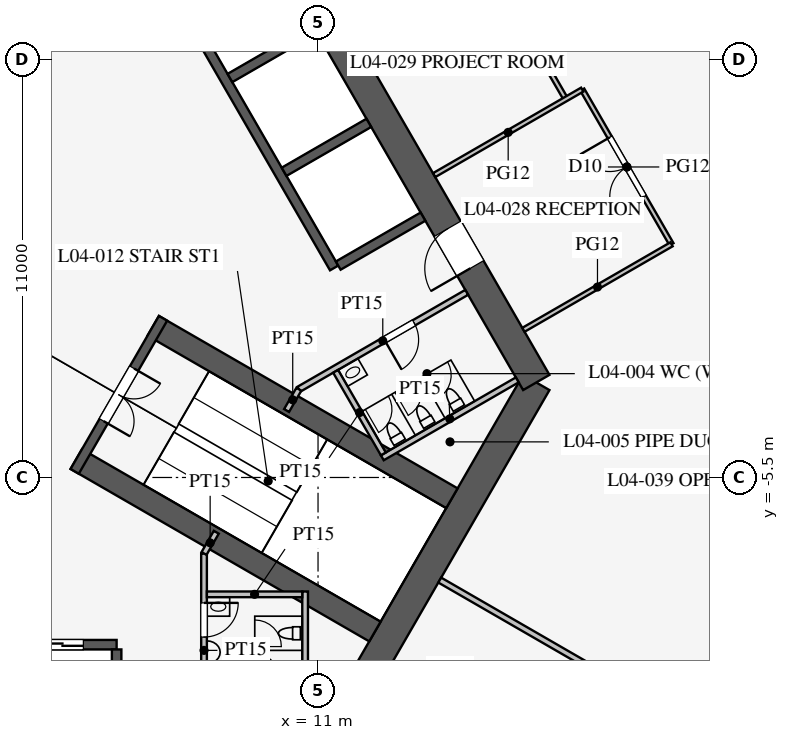
"""IFC4 building model, lengths in metres.
Left out: names, types, materials, properties, quantities, classifications, styles, units other than length and angle.
Written with IfcOpenShell. Run it as: python <this file> out.ifc"""

import sys

from ifc_helpers import new_model, si_unit, direction, frame, frame_2d, origin, place, context, subcontext, project, spatial, rectangle, extrude, element, fill, save


model = new_model("IFC4")
c1 = context("Model", 3, precision=1e-05, world=origin(), true_north=direction((0.0, 1.0)))
c2 = subcontext(c1, "Body", "Model", "MODEL_VIEW")
j1 = project(units=[si_unit("LENGTHUNIT", "METRE"), si_unit("PLANEANGLEUNIT", "RADIAN")], contexts=[c1])
p1 = place(None, origin())
s1 = spatial("IfcSite", under=j1, at=p1, CompositionType="ELEMENT")
p2 = place(p1, origin())
s2 = spatial("IfcBuilding", under=s1, at=p2, CompositionType="ELEMENT")
p3 = place(p2, frame((0.0, 0.0, 20.7)))
s3 = spatial("IfcBuildingStorey", under=s2, at=p3, CompositionType="ELEMENT", Elevation=20.7)
p4 = place(p3, frame((10.97, -13.0, 0.0), z_axis=(0.0, 0.0, 1.0), x_axis=(0.499995765644, 0.866027848477, 0.0)))
e1 = element("IfcWall", 1, at=p4, inside=s3, PredefinedType="SHEAR", context=c2, shape_type="SweptSolid", body=[
    extrude(rectangle(XDim=11.547, YDim=0.8, at=frame_2d((5.773, 0.0))), origin(), (0.0, 0.0, 1.0), 4.2),
])
p5 = place(p3, frame((16.743, -3.0, 0.0), z_axis=(0.0, 0.0, 1.0), x_axis=(-0.500002442456, 0.866023993627, 0.0)))
e2 = element("IfcWall", 2, at=p5, inside=s3, PredefinedType="SHEAR", context=c2, shape_type="SweptSolid", body=[
    extrude(rectangle(XDim=21.939, YDim=0.8, at=frame_2d((10.97, 0.0))), origin(), (0.0, 0.0, 1.0), 4.2),
])
p6 = place(p5, frame((17.27, 0.0, 0.0)))
e3 = element("IfcOpeningElement", 3, at=p6, cuts=e2, PredefinedType="OPENING", context=c2, shape_type="SweptSolid", body=[
    extrude(rectangle(XDim=1.2, YDim=2.1, at=frame_2d((0.6, 1.05))), frame((0.0, 0.41, 0.0), z_axis=(0.0, -1.0, 0.0), x_axis=(1.0, 0.0, 0.0)), (0.0, 0.0, 1.0), 0.82),
])
p7 = place(p5, frame((3.47, 0.0, 0.0)))
e4 = element("IfcOpeningElement", 4, at=p7, cuts=e2, PredefinedType="OPENING", context=c2, shape_type="SweptSolid", body=[
    extrude(rectangle(XDim=1.2, YDim=2.1, at=frame_2d((0.6, 1.05))), frame((0.0, 0.41, 0.0), z_axis=(0.0, -1.0, 0.0), x_axis=(1.0, 0.0, 0.0)), (0.0, 0.0, 1.0), 0.82),
])
p8 = place(p3, frame((-5.7, -9.9, 0.0), z_axis=(0.0, 0.0, 1.0), x_axis=(1.0, 0.0, 0.0)))
e5 = element("IfcWall", 5, at=p8, inside=s3, PredefinedType="SHEAR", context=c2, shape_type="SweptSolid", body=[
    extrude(rectangle(XDim=11.4, YDim=0.25, at=frame_2d((5.7, 0.0))), origin(), (0.0, 0.0, 1.0), 4.2),
])
p9 = place(p8, frame((0.875, 0.0, 0.0)))
e6 = element("IfcOpeningElement", 6, at=p9, cuts=e5, PredefinedType="OPENING", context=c2, shape_type="SweptSolid", body=[
    extrude(rectangle(XDim=1.1, YDim=2.2, at=frame_2d((0.55, 1.1))), frame((0.0, 0.135, 0.0), z_axis=(0.0, -1.0, 0.0), x_axis=(1.0, 0.0, 0.0)), (0.0, 0.0, 1.0), 0.27),
])
p10 = place(p8, frame((3.725, 0.0, 0.0)))
e7 = element("IfcOpeningElement", 7, at=p10, cuts=e5, PredefinedType="OPENING", context=c2, shape_type="SweptSolid", body=[
    extrude(rectangle(XDim=1.1, YDim=2.2, at=frame_2d((0.55, 1.1))), frame((0.0, 0.135, 0.0), z_axis=(0.0, -1.0, 0.0), x_axis=(1.0, 0.0, 0.0)), (0.0, 0.0, 1.0), 0.27),
])
p11 = place(p8, frame((6.575, 0.0, 0.0)))
e8 = element("IfcOpeningElement", 8, at=p11, cuts=e5, PredefinedType="OPENING", context=c2, shape_type="SweptSolid", body=[
    extrude(rectangle(XDim=1.1, YDim=2.2, at=frame_2d((0.55, 1.1))), frame((0.0, 0.135, 0.0), z_axis=(0.0, -1.0, 0.0), x_axis=(1.0, 0.0, 0.0)), (0.0, 0.0, 1.0), 0.27),
])
p12 = place(p8, frame((9.425, 0.0, 0.0)))
e9 = element("IfcOpeningElement", 9, at=p12, cuts=e5, PredefinedType="OPENING", context=c2, shape_type="SweptSolid", body=[
    extrude(rectangle(XDim=1.1, YDim=2.2, at=frame_2d((0.55, 1.1))), frame((0.0, 0.135, 0.0), z_axis=(0.0, -1.0, 0.0), x_axis=(1.0, 0.0, 0.0)), (0.0, 0.0, 1.0), 0.27),
])
p13 = place(p3, frame((5.7, -10.025, 0.0), z_axis=(0.0, 0.0, 1.0), x_axis=(0.0, -1.0, 0.0)))
e10 = element("IfcWall", 10, at=p13, inside=s3, PredefinedType="SHEAR", context=c2, shape_type="SweptSolid", body=[
    extrude(rectangle(XDim=2.575, YDim=0.25, at=frame_2d((1.288, 0.0))), origin(), (0.0, 0.0, 1.0), 4.2),
])
p14 = place(p3, frame((11.424, 0.014, 0.0), z_axis=(0.0, 0.0, 1.0), x_axis=(-0.500001763848, 0.866024385424, 0.0)))
e11 = element("IfcWall", 11, at=p14, inside=s3, PredefinedType="SHEAR", context=c2, shape_type="SweptSolid", body=[
    extrude(rectangle(XDim=11.4, YDim=0.25, at=frame_2d((5.7, 0.0))), origin(), (0.0, 0.0, 1.0), 4.2),
])
for number, where, z_axis, x_axis in (
    (12, (11.532, 0.076, 0.0), (0.0, 0.0, 1.0), (0.866, 0.5, 0.0)),
    (13, (10.107, 2.544, 0.0), (0.0, 0.0, 1.0), (0.866, 0.5, 0.0)),
    (14, (8.682, 5.012, 0.0), (0.0, 0.0, 1.0), (0.866, 0.5, 0.0)),
):
    element("IfcWall", number, at=place(p3, frame(where, z_axis=z_axis, x_axis=x_axis)), inside=s3, PredefinedType="SHEAR", context=c2, shape_type="SweptSolid", body=[
        extrude(rectangle(XDim=2.575, YDim=0.25, at=frame_2d((1.288, 0.0))), origin(), (0.0, 0.0, 1.0), 4.2),
    ])
for number, where, z_axis, x_axis in (
    (15, (4.638, -5.016, 0.0), (0.0, 0.0, 1.0), (0.866, -0.5, 0.0)),
    (16, (6.663, -1.509, 0.0), (0.0, 0.0, 1.0), (0.866, -0.5, 0.0)),
):
    element("IfcWall", number, at=place(p3, frame(where, z_axis=z_axis, x_axis=x_axis)), inside=s3, PredefinedType="SHEAR", context=c2, shape_type="SweptSolid", body=[
        extrude(rectangle(XDim=9.075, YDim=0.6, at=frame_2d((4.538, 0.0))), origin(), (0.0, 0.0, 1.0), 4.2),
    ])
p15 = place(p3, frame((4.597, -5.339, 0.0), z_axis=(0.0, 0.0, 1.0), x_axis=(0.499984536904, 0.866034331223, 0.0)))
e17 = element("IfcWall", 17, at=p15, inside=s3, PredefinedType="SHEAR", context=c2, shape_type="SweptSolid", body=[
    extrude(rectangle(XDim=4.65, YDim=0.25, at=frame_2d((2.325, 0.0))), origin(), (0.0, 0.0, 1.0), 4.2),
])
p16 = place(p15, frame((1.525, 0.0, 0.0)))
e18 = element("IfcOpeningElement", 18, at=p16, cuts=e17, PredefinedType="OPENING", context=c2, shape_type="SweptSolid", body=[
    extrude(rectangle(XDim=1.6, YDim=2.1, at=frame_2d((0.8, 1.05))), frame((0.0, 0.135, 0.0), z_axis=(0.0, -1.0, 0.0), x_axis=(1.0, 0.0, 0.0)), (0.0, 0.0, 1.0), 0.27),
])
p17 = place(p3, frame((8.0, -7.5, 0.0), z_axis=(0.0, 0.0, 1.0), x_axis=(0.0, -1.0, 0.0)))
e19 = element("IfcWall", 19, at=p17, inside=s3, PredefinedType="PARTITIONING", context=c2, shape_type="SweptSolid", body=[
    extrude(rectangle(XDim=5.1, YDim=0.15, at=frame_2d((2.55, 0.0))), origin(), (0.0, 0.0, 1.0), 4.0),
])
p18 = place(p17, frame((1.3, 0.0, 0.0)))
e20 = element("IfcOpeningElement", 20, at=p18, cuts=e19, PredefinedType="OPENING", context=c2, shape_type="SweptSolid", body=[
    extrude(rectangle(XDim=0.9, YDim=2.1, at=frame_2d((0.45, 1.05))), frame((0.0, 0.085, 0.0), z_axis=(0.0, -1.0, 0.0), x_axis=(1.0, 0.0, 0.0)), (0.0, 0.0, 1.0), 0.17),
])
p19 = place(p3, frame((10.495, -3.178, 0.0), z_axis=(0.0, 0.0, 1.0), x_axis=(0.86602216432, 0.500005610874, 0.0)))
e21 = element("IfcWall", 21, at=p19, inside=s3, PredefinedType="PARTITIONING", context=c2, shape_type="SweptSolid", body=[
    extrude(rectangle(XDim=5.1, YDim=0.15, at=frame_2d((2.55, 0.0))), origin(), (0.0, 0.0, 1.0), 4.0),
])
p20 = place(p19, frame((2.6, 0.0, 0.0)))
e22 = element("IfcOpeningElement", 22, at=p20, cuts=e21, PredefinedType="OPENING", context=c2, shape_type="SweptSolid", body=[
    extrude(rectangle(XDim=0.9, YDim=2.1, at=frame_2d((0.45, 1.05))), frame((0.0, 0.085, 0.0), z_axis=(0.0, -1.0, 0.0), x_axis=(1.0, 0.0, 0.0)), (0.0, 0.0, 1.0), 0.17),
])
for number, where, z_axis, x_axis in (
    (23, (8.0, -7.5, 0.0), (0.0, 0.0, 1.0), (0.5, 0.866, 0.0)),
    (24, (10.495, -3.178, 0.0), (0.0, 0.0, 1.0), (-0.5, -0.866, 0.0)),
):
    element("IfcWall", number, at=place(p3, frame(where, z_axis=z_axis, x_axis=x_axis)), inside=s3, PredefinedType="PARTITIONING", context=c2, shape_type="SweptSolid", body=[
        extrude(rectangle(XDim=0.645, YDim=0.15, at=frame_2d((0.323, 0.0))), origin(), (0.0, 0.0, 1.0), 4.0),
    ])
p21 = place(p3, frame((10.66, -8.5, 0.0), z_axis=(0.0, 0.0, 1.0), x_axis=(0.0, -1.0, 0.0)))
e25 = element("IfcWall", 25, at=p21, inside=s3, PredefinedType="PARTITIONING", context=c2, shape_type="SweptSolid", body=[
    extrude(rectangle(XDim=4.1, YDim=0.15, at=frame_2d((2.05, 0.0))), origin(), (0.0, 0.0, 1.0), 4.0),
])
p22 = place(p3, frame((8.075, -8.575, 0.0), z_axis=(0.0, 0.0, 1.0), x_axis=(1.0, 0.0, 0.0)))
e26 = element("IfcWall", 26, at=p22, inside=s3, PredefinedType="PARTITIONING", context=c2, shape_type="SweptSolid", body=[
    extrude(rectangle(XDim=2.51, YDim=0.15, at=frame_2d((1.255, 0.0))), origin(), (0.0, 0.0, 1.0), 4.0),
])
p23 = place(p3, frame((12.691, -4.982, 0.0), z_axis=(0.0, 0.0, 1.0), x_axis=(0.8660249478, 0.500000789788, 0.0)))
e27 = element("IfcWall", 27, at=p23, inside=s3, PredefinedType="PARTITIONING", context=c2, shape_type="SweptSolid", body=[
    extrude(rectangle(XDim=4.1, YDim=0.15, at=frame_2d((2.05, 0.0))), origin(), (0.0, 0.0, 1.0), 4.0),
])
p24 = place(p3, frame((11.464, -2.706, 0.0), z_axis=(0.0, 0.0, 1.0), x_axis=(0.50001992892, -0.866013897511, 0.0)))
e28 = element("IfcWall", 28, at=p24, inside=s3, PredefinedType="PARTITIONING", context=c2, shape_type="SweptSolid", body=[
    extrude(rectangle(XDim=2.51, YDim=0.15, at=frame_2d((1.255, 0.0))), origin(), (0.0, 0.0, 1.0), 4.0),
])
p25 = place(p3, frame((14.203, -8.2, 0.0), z_axis=(0.0, 0.0, 1.0), x_axis=(0.866024965723, -0.500000758745, 0.0)))
e29 = element("IfcWall", 29, at=p25, inside=s3, PredefinedType="PARTITIONING", context=c2, shape_type="SweptSolid", body=[
    extrude(rectangle(XDim=18.25, YDim=0.15, at=frame_2d((9.125, 0.0))), origin(), (0.0, 0.0, 1.0), 2.3),
])
p26 = place(p3, frame((17.519, 4.457, 0.0), z_axis=(0.0, 0.0, 1.0), x_axis=(-0.500013631625, 0.866017533419, 0.0)))
e30 = element("IfcWall", 30, at=p26, inside=s3, PredefinedType="PARTITIONING", context=c2, shape_type="SweptSolid", body=[
    extrude(rectangle(XDim=4.5, YDim=0.12, at=frame_2d((2.25, 0.0))), origin(), (0.0, 0.0, 1.0), 2.9),
])
p27 = place(p26, frame((1.75, 0.0, 0.15)))
e31 = element("IfcOpeningElement", 31, at=p27, cuts=e30, PredefinedType="OPENING", context=c2, shape_type="SweptSolid", body=[
    extrude(rectangle(XDim=1.0, YDim=2.1, at=frame_2d((0.5, 1.05))), frame((0.0, 0.07, 0.0), z_axis=(0.0, -1.0, 0.0), x_axis=(1.0, 0.0, 0.0)), (0.0, 0.0, 1.0), 0.14),
])
p28 = place(p3, frame((20.302, 0.636, 0.0), z_axis=(0.0, 0.0, 1.0), x_axis=(-0.499977259774, 0.866038532462, 0.0)))
e32 = element("IfcWall", 32, at=p28, inside=s3, PredefinedType="PARTITIONING", context=c2, shape_type="SweptSolid", body=[
    extrude(rectangle(XDim=4.7, YDim=0.12, at=frame_2d((2.35, 0.0))), origin(), (0.0, 0.0, 1.0), 2.9),
])
p29 = place(p28, frame((1.45, 0.0, 0.15)))
e33 = element("IfcOpeningElement", 33, at=p29, cuts=e32, PredefinedType="OPENING", context=c2, shape_type="SweptSolid", body=[
    extrude(rectangle(XDim=1.8, YDim=2.1, at=frame_2d((0.9, 1.05))), frame((0.0, 0.07, 0.0), z_axis=(0.0, -1.0, 0.0), x_axis=(1.0, 0.0, 0.0)), (0.0, 0.0, 1.0), 0.14),
])
p30 = place(p3, frame((14.055, 2.457, 0.0), z_axis=(0.0, 0.0, 1.0), x_axis=(0.866031096941, 0.499990139034, 0.0)))
e34 = element("IfcWall", 34, at=p30, inside=s3, PredefinedType="PARTITIONING", context=c2, shape_type="SweptSolid", body=[
    extrude(rectangle(XDim=4.5, YDim=0.12, at=frame_2d((2.25, 0.0))), origin(), (0.0, 0.0, 1.0), 2.9),
])
p31 = place(p3, frame((16.405, -1.614, 0.0), z_axis=(0.0, 0.0, 1.0), x_axis=(0.866017533419, 0.500013631625, 0.0)))
e35 = element("IfcWall", 35, at=p31, inside=s3, PredefinedType="PARTITIONING", context=c2, shape_type="SweptSolid", body=[
    extrude(rectangle(XDim=4.5, YDim=0.12, at=frame_2d((2.25, 0.0))), origin(), (0.0, 0.0, 1.0), 2.9),
])
p32 = place(p18, origin())
e36 = element("IfcDoor", 36, at=p32, inside=s3, OperationType="SINGLE_SWING_LEFT", PredefinedType="DOOR", context=c2, shape_type="SweptSolid", body=[
    extrude(rectangle(XDim=0.9, YDim=2.1, at=frame_2d((0.45, 1.05))), frame((0.0, 0.025, 0.0), z_axis=(0.0, -1.0, 0.0), x_axis=(1.0, 0.0, 0.0)), (0.0, 0.0, 1.0), 0.05),
])
fill(e20, e36)
p33 = place(p20, frame((0.9, 0.0, 0.0), z_axis=(0.0, 0.0, 1.0), x_axis=(-1.0, 0.0, 0.0)))
e37 = element("IfcDoor", 37, at=p33, inside=s3, OperationType="SINGLE_SWING_RIGHT", PredefinedType="DOOR", context=c2, shape_type="SweptSolid", body=[
    extrude(rectangle(XDim=0.9, YDim=2.1, at=frame_2d((0.45, 1.05))), frame((0.0, 0.025, 0.0), z_axis=(0.0, -1.0, 0.0), x_axis=(1.0, 0.0, 0.0)), (0.0, 0.0, 1.0), 0.05),
])
fill(e22, e37)
p34 = place(p16, frame((1.6, 0.0, 0.0), z_axis=(0.0, 0.0, 1.0), x_axis=(-1.0, 0.0, 0.0)))
e38 = element("IfcDoor", 38, at=p34, inside=s3, OperationType="DOUBLE_DOOR_SINGLE_SWING", PredefinedType="DOOR", context=c2, shape_type="SweptSolid", body=[
    extrude(rectangle(XDim=1.6, YDim=2.1, at=frame_2d((0.8, 1.05))), frame((0.0, 0.025, 0.0), z_axis=(0.0, -1.0, 0.0), x_axis=(1.0, 0.0, 0.0)), (0.0, 0.0, 1.0), 0.05),
])
fill(e18, e38)
p35 = place(p7, origin())
e39 = element("IfcDoor", 39, at=p35, inside=s3, OperationType="SINGLE_SWING_LEFT", PredefinedType="DOOR", context=c2, shape_type="SweptSolid", body=[
    extrude(rectangle(XDim=1.2, YDim=2.1, at=frame_2d((0.6, 1.05))), frame((0.0, 0.025, 0.0), z_axis=(0.0, -1.0, 0.0), x_axis=(1.0, 0.0, 0.0)), (0.0, 0.0, 1.0), 0.05),
])
fill(e4, e39)
p36 = place(p29, origin())
e40 = element("IfcDoor", 40, at=p36, inside=s3, OperationType="DOUBLE_DOOR_SINGLE_SWING", PredefinedType="DOOR", context=c2, shape_type="SweptSolid", body=[
    extrude(rectangle(XDim=1.8, YDim=2.1, at=frame_2d((0.9, 1.05))), frame((0.0, 0.025, 0.0), z_axis=(0.0, -1.0, 0.0), x_axis=(1.0, 0.0, 0.0)), (0.0, 0.0, 1.0), 0.05),
])
fill(e33, e40)
p37 = place(p12, origin())
e41 = element("IfcDoor", 41, at=p37, inside=s3, OperationType="DOUBLE_DOOR_SLIDING", PredefinedType="DOOR", context=c2, shape_type="SweptSolid", body=[
    extrude(rectangle(XDim=1.1, YDim=2.2, at=frame_2d((0.55, 1.1))), frame((0.0, 0.025, 0.0), z_axis=(0.0, -1.0, 0.0), x_axis=(1.0, 0.0, 0.0)), (0.0, 0.0, 1.0), 0.05),
])
fill(e9, e41)
save(model, sys.argv[1])
